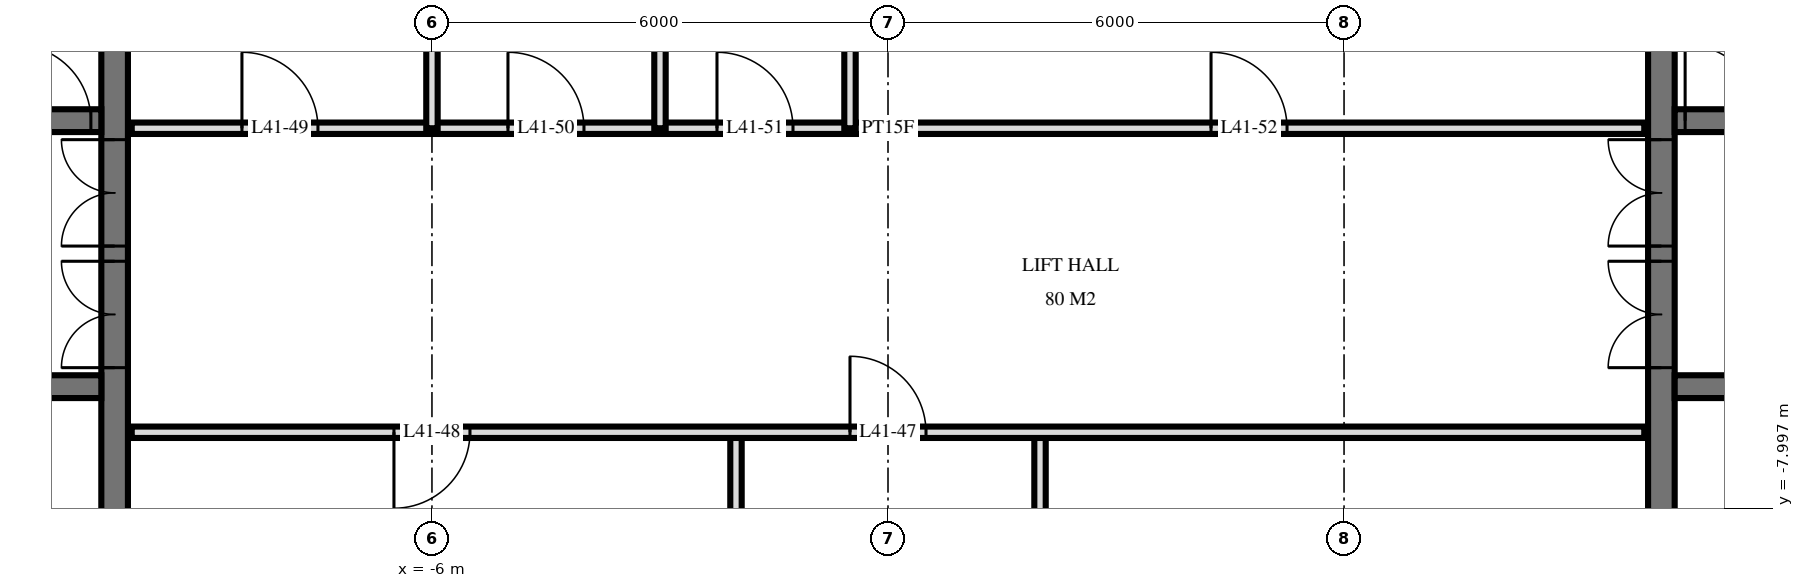
"""IFC4 building model, lengths in metres.
Left out: names, types, materials, properties, quantities, classifications, styles, units other than length and angle.
Written with IfcOpenShell. Run it as: python <this file> out.ifc"""

import sys

from ifc_helpers import new_model, si_unit, direction, frame, frame_2d, origin, place, context, subcontext, project, spatial, rectangle, extrude, element, fill, save


model = new_model("IFC4")
c1 = context("Model", 3, precision=1e-05, world=origin(), true_north=direction((0.0, 1.0)))
c2 = subcontext(c1, "Body", "Model", "MODEL_VIEW")
j1 = project(units=[si_unit("LENGTHUNIT", "METRE"), si_unit("PLANEANGLEUNIT", "RADIAN")], contexts=[c1])
p1 = place(None, origin())
s1 = spatial("IfcSite", under=j1, at=p1, CompositionType="ELEMENT")
p2 = place(p1, origin())
s2 = spatial("IfcBuilding", under=s1, at=p2, CompositionType="ELEMENT")
p3 = place(p2, frame((0.0, 0.0, 159.6)))
s3 = spatial("IfcBuildingStorey", under=s2, at=p3, CompositionType="ELEMENT", Elevation=159.6)
p4 = place(p3, frame((-10.175, -14.55, 0.0), z_axis=(0.0, 0.0, 1.0), x_axis=(0.0, 1.0, 0.0)))
e1 = element("IfcWall", 1, at=p4, inside=s3, PredefinedType="SHEAR", context=c2, shape_type="SweptSolid", body=[
    extrude(rectangle(XDim=14.1, YDim=0.35, at=frame_2d((7.05, 0.0))), origin(), (0.0, 0.0, 1.0), 3.6),
])
p5 = place(p4, frame((8.4, 0.0, 0.0)))
e2 = element("IfcOpeningElement", 2, at=p5, cuts=e1, PredefinedType="OPENING", context=c2, shape_type="SweptSolid", body=[
    extrude(rectangle(XDim=1.4, YDim=2.4, at=frame_2d((0.7, 1.2))), frame((0.0, 0.185, 0.0), z_axis=(0.0, -1.0, 0.0), x_axis=(1.0, 0.0, 0.0)), (0.0, 0.0, 1.0), 0.37),
])
p6 = place(p4, frame((10.0, 0.0, 0.0)))
e3 = element("IfcOpeningElement", 3, at=p6, cuts=e1, PredefinedType="OPENING", context=c2, shape_type="SweptSolid", body=[
    extrude(rectangle(XDim=1.4, YDim=2.4, at=frame_2d((0.7, 1.2))), frame((0.0, 0.185, 0.0), z_axis=(0.0, -1.0, 0.0), x_axis=(1.0, 0.0, 0.0)), (0.0, 0.0, 1.0), 0.37),
])
p7 = place(p4, frame((4.0, 0.0, 0.0)))
e4 = element("IfcOpeningElement", 4, at=p7, cuts=e1, PredefinedType="OPENING", context=c2, shape_type="SweptSolid", body=[
    extrude(rectangle(XDim=1.2, YDim=2.1, at=frame_2d((0.6, 1.05))), frame((0.0, 0.185, 0.0), z_axis=(0.0, -1.0, 0.0), x_axis=(1.0, 0.0, 0.0)), (0.0, 0.0, 1.0), 0.37),
])
p8 = place(p3, frame((-24.05, -2.9, 0.0), z_axis=(0.0, 0.0, 1.0), x_axis=(1.0, 0.0, 0.0)))
e5 = element("IfcWall", 5, at=p8, inside=s3, PredefinedType="SHEAR", context=c2, shape_type="SweptSolid", body=[
    extrude(rectangle(XDim=13.7, YDim=0.3, at=frame_2d((6.85, 0.0))), origin(), (0.0, 0.0, 1.0), 3.6),
])
p9 = place(p8, frame((0.55, 0.0, 0.0)))
e6 = element("IfcOpeningElement", 6, at=p9, cuts=e5, PredefinedType="OPENING", context=c2, shape_type="SweptSolid", body=[
    extrude(rectangle(XDim=1.1, YDim=2.1, at=frame_2d((0.55, 1.05))), frame((0.0, 0.16, 0.0), z_axis=(0.0, -1.0, 0.0), x_axis=(1.0, 0.0, 0.0)), (0.0, 0.0, 1.0), 0.32),
])
p10 = place(p8, frame((6.613, 0.0, 0.0)))
e7 = element("IfcOpeningElement", 7, at=p10, cuts=e5, PredefinedType="OPENING", context=c2, shape_type="SweptSolid", body=[
    extrude(rectangle(XDim=0.9, YDim=2.1, at=frame_2d((0.45, 1.05))), frame((0.0, 0.16, 0.0), z_axis=(0.0, -1.0, 0.0), x_axis=(1.0, 0.0, 0.0)), (0.0, 0.0, 1.0), 0.32),
])
p11 = place(p8, frame((5.188, 0.0, 0.0)))
e8 = element("IfcOpeningElement", 8, at=p11, cuts=e5, PredefinedType="OPENING", context=c2, shape_type="SweptSolid", body=[
    extrude(rectangle(XDim=0.9, YDim=2.1, at=frame_2d((0.45, 1.05))), frame((0.0, 0.16, 0.0), z_axis=(0.0, -1.0, 0.0), x_axis=(1.0, 0.0, 0.0)), (0.0, 0.0, 1.0), 0.32),
])
p12 = place(p8, frame((12.562, 0.0, 0.0)))
e9 = element("IfcOpeningElement", 9, at=p12, cuts=e5, PredefinedType="OPENING", context=c2, shape_type="SweptSolid", body=[
    extrude(rectangle(XDim=1.0, YDim=2.1, at=frame_2d((0.5, 1.05))), frame((0.0, 0.16, 0.0), z_axis=(0.0, -1.0, 0.0), x_axis=(1.0, 0.0, 0.0)), (0.0, 0.0, 1.0), 0.32),
])
p13 = place(p8, frame((11.137, 0.0, 0.0)))
e10 = element("IfcOpeningElement", 10, at=p13, cuts=e5, PredefinedType="OPENING", context=c2, shape_type="SweptSolid", body=[
    extrude(rectangle(XDim=1.0, YDim=2.1, at=frame_2d((0.5, 1.05))), frame((0.0, 0.16, 0.0), z_axis=(0.0, -1.0, 0.0), x_axis=(1.0, 0.0, 0.0)), (0.0, 0.0, 1.0), 0.32),
])
p14 = place(p8, frame((8.85, 0.0, 0.0)))
e11 = element("IfcOpeningElement", 11, at=p14, cuts=e5, PredefinedType="OPENING", context=c2, shape_type="SweptSolid", body=[
    extrude(rectangle(XDim=1.0, YDim=2.1, at=frame_2d((0.5, 1.05))), frame((0.0, 0.16, 0.0), z_axis=(0.0, -1.0, 0.0), x_axis=(1.0, 0.0, 0.0)), (0.0, 0.0, 1.0), 0.32),
])
p15 = place(p8, frame((3.0, 0.0, 0.0)))
e12 = element("IfcOpeningElement", 12, at=p15, cuts=e5, PredefinedType="OPENING", context=c2, shape_type="SweptSolid", body=[
    extrude(rectangle(XDim=1.0, YDim=2.1, at=frame_2d((0.5, 1.05))), frame((0.0, 0.16, 0.0), z_axis=(0.0, -1.0, 0.0), x_axis=(1.0, 0.0, 0.0)), (0.0, 0.0, 1.0), 0.32),
])
p16 = place(p3, frame((-24.05, -6.4, 0.0), z_axis=(0.0, 0.0, 1.0), x_axis=(1.0, 0.0, 0.0)))
e13 = element("IfcWall", 13, at=p16, inside=s3, PredefinedType="SHEAR", context=c2, shape_type="SweptSolid", body=[
    extrude(rectangle(XDim=13.7, YDim=0.3, at=frame_2d((6.85, 0.0))), origin(), (0.0, 0.0, 1.0), 3.6),
])
p17 = place(p16, frame((0.55, 0.0, 0.0)))
e14 = element("IfcOpeningElement", 14, at=p17, cuts=e13, PredefinedType="OPENING", context=c2, shape_type="SweptSolid", body=[
    extrude(rectangle(XDim=1.1, YDim=2.1, at=frame_2d((0.55, 1.05))), frame((0.0, 0.16, 0.0), z_axis=(0.0, -1.0, 0.0), x_axis=(1.0, 0.0, 0.0)), (0.0, 0.0, 1.0), 0.32),
])
p18 = place(p16, frame((5.8, 0.0, 0.0)))
e15 = element("IfcOpeningElement", 15, at=p18, cuts=e13, PredefinedType="OPENING", context=c2, shape_type="SweptSolid", body=[
    extrude(rectangle(XDim=1.1, YDim=2.1, at=frame_2d((0.55, 1.05))), frame((0.0, 0.16, 0.0), z_axis=(0.0, -1.0, 0.0), x_axis=(1.0, 0.0, 0.0)), (0.0, 0.0, 1.0), 0.32),
])
p19 = place(p3, frame((10.175, -14.55, 0.0), z_axis=(0.0, 0.0, 1.0), x_axis=(0.0, 1.0, 0.0)))
e16 = element("IfcWall", 16, at=p19, inside=s3, PredefinedType="SHEAR", context=c2, shape_type="SweptSolid", body=[
    extrude(rectangle(XDim=14.1, YDim=0.35, at=frame_2d((7.05, 0.0))), origin(), (0.0, 0.0, 1.0), 3.6),
])
p20 = place(p19, frame((8.4, 0.0, 0.0)))
e17 = element("IfcOpeningElement", 17, at=p20, cuts=e16, PredefinedType="OPENING", context=c2, shape_type="SweptSolid", body=[
    extrude(rectangle(XDim=1.4, YDim=2.4, at=frame_2d((0.7, 1.2))), frame((0.0, 0.185, 0.0), z_axis=(0.0, -1.0, 0.0), x_axis=(1.0, 0.0, 0.0)), (0.0, 0.0, 1.0), 0.37),
])
p21 = place(p19, frame((10.0, 0.0, 0.0)))
e18 = element("IfcOpeningElement", 18, at=p21, cuts=e16, PredefinedType="OPENING", context=c2, shape_type="SweptSolid", body=[
    extrude(rectangle(XDim=1.4, YDim=2.4, at=frame_2d((0.7, 1.2))), frame((0.0, 0.185, 0.0), z_axis=(0.0, -1.0, 0.0), x_axis=(1.0, 0.0, 0.0)), (0.0, 0.0, 1.0), 0.37),
])
p22 = place(p19, frame((4.0, 0.0, 0.0)))
e19 = element("IfcOpeningElement", 19, at=p22, cuts=e16, PredefinedType="OPENING", context=c2, shape_type="SweptSolid", body=[
    extrude(rectangle(XDim=1.2, YDim=2.1, at=frame_2d((0.6, 1.05))), frame((0.0, 0.185, 0.0), z_axis=(0.0, -1.0, 0.0), x_axis=(1.0, 0.0, 0.0)), (0.0, 0.0, 1.0), 0.37),
])
p23 = place(p3, frame((10.35, -2.9, 0.0), z_axis=(0.0, 0.0, 1.0), x_axis=(1.0, 0.0, 0.0)))
e20 = element("IfcWall", 20, at=p23, inside=s3, PredefinedType="SHEAR", context=c2, shape_type="SweptSolid", body=[
    extrude(rectangle(XDim=13.7, YDim=0.3, at=frame_2d((6.85, 0.0))), origin(), (0.0, 0.0, 1.0), 3.6),
])
p24 = place(p23, frame((12.05, 0.0, 0.0)))
e21 = element("IfcOpeningElement", 21, at=p24, cuts=e20, PredefinedType="OPENING", context=c2, shape_type="SweptSolid", body=[
    extrude(rectangle(XDim=1.1, YDim=2.1, at=frame_2d((0.55, 1.05))), frame((0.0, 0.16, 0.0), z_axis=(0.0, -1.0, 0.0), x_axis=(1.0, 0.0, 0.0)), (0.0, 0.0, 1.0), 0.32),
])
p25 = place(p23, frame((6.188, 0.0, 0.0)))
e22 = element("IfcOpeningElement", 22, at=p25, cuts=e20, PredefinedType="OPENING", context=c2, shape_type="SweptSolid", body=[
    extrude(rectangle(XDim=0.9, YDim=2.1, at=frame_2d((0.45, 1.05))), frame((0.0, 0.16, 0.0), z_axis=(0.0, -1.0, 0.0), x_axis=(1.0, 0.0, 0.0)), (0.0, 0.0, 1.0), 0.32),
])
p26 = place(p23, frame((7.613, 0.0, 0.0)))
e23 = element("IfcOpeningElement", 23, at=p26, cuts=e20, PredefinedType="OPENING", context=c2, shape_type="SweptSolid", body=[
    extrude(rectangle(XDim=0.9, YDim=2.1, at=frame_2d((0.45, 1.05))), frame((0.0, 0.16, 0.0), z_axis=(0.0, -1.0, 0.0), x_axis=(1.0, 0.0, 0.0)), (0.0, 0.0, 1.0), 0.32),
])
p27 = place(p23, frame((0.137, 0.0, 0.0)))
e24 = element("IfcOpeningElement", 24, at=p27, cuts=e20, PredefinedType="OPENING", context=c2, shape_type="SweptSolid", body=[
    extrude(rectangle(XDim=1.0, YDim=2.1, at=frame_2d((0.5, 1.05))), frame((0.0, 0.16, 0.0), z_axis=(0.0, -1.0, 0.0), x_axis=(1.0, 0.0, 0.0)), (0.0, 0.0, 1.0), 0.32),
])
p28 = place(p23, frame((1.562, 0.0, 0.0)))
e25 = element("IfcOpeningElement", 25, at=p28, cuts=e20, PredefinedType="OPENING", context=c2, shape_type="SweptSolid", body=[
    extrude(rectangle(XDim=1.0, YDim=2.1, at=frame_2d((0.5, 1.05))), frame((0.0, 0.16, 0.0), z_axis=(0.0, -1.0, 0.0), x_axis=(1.0, 0.0, 0.0)), (0.0, 0.0, 1.0), 0.32),
])
p29 = place(p23, frame((3.85, 0.0, 0.0)))
e26 = element("IfcOpeningElement", 26, at=p29, cuts=e20, PredefinedType="OPENING", context=c2, shape_type="SweptSolid", body=[
    extrude(rectangle(XDim=1.0, YDim=2.1, at=frame_2d((0.5, 1.05))), frame((0.0, 0.16, 0.0), z_axis=(0.0, -1.0, 0.0), x_axis=(1.0, 0.0, 0.0)), (0.0, 0.0, 1.0), 0.32),
])
p30 = place(p23, frame((9.7, 0.0, 0.0)))
e27 = element("IfcOpeningElement", 27, at=p30, cuts=e20, PredefinedType="OPENING", context=c2, shape_type="SweptSolid", body=[
    extrude(rectangle(XDim=1.0, YDim=2.1, at=frame_2d((0.5, 1.05))), frame((0.0, 0.16, 0.0), z_axis=(0.0, -1.0, 0.0), x_axis=(1.0, 0.0, 0.0)), (0.0, 0.0, 1.0), 0.32),
])
p31 = place(p3, frame((10.35, -6.4, 0.0), z_axis=(0.0, 0.0, 1.0), x_axis=(1.0, 0.0, 0.0)))
e28 = element("IfcWall", 28, at=p31, inside=s3, PredefinedType="SHEAR", context=c2, shape_type="SweptSolid", body=[
    extrude(rectangle(XDim=13.7, YDim=0.3, at=frame_2d((6.85, 0.0))), origin(), (0.0, 0.0, 1.0), 3.6),
])
p32 = place(p31, frame((12.05, 0.0, 0.0)))
e29 = element("IfcOpeningElement", 29, at=p32, cuts=e28, PredefinedType="OPENING", context=c2, shape_type="SweptSolid", body=[
    extrude(rectangle(XDim=1.1, YDim=2.1, at=frame_2d((0.55, 1.05))), frame((0.0, 0.16, 0.0), z_axis=(0.0, -1.0, 0.0), x_axis=(1.0, 0.0, 0.0)), (0.0, 0.0, 1.0), 0.32),
])
p33 = place(p31, frame((6.8, 0.0, 0.0)))
e30 = element("IfcOpeningElement", 30, at=p33, cuts=e28, PredefinedType="OPENING", context=c2, shape_type="SweptSolid", body=[
    extrude(rectangle(XDim=1.1, YDim=2.1, at=frame_2d((0.55, 1.05))), frame((0.0, 0.16, 0.0), z_axis=(0.0, -1.0, 0.0), x_axis=(1.0, 0.0, 0.0)), (0.0, 0.0, 1.0), 0.32),
])
p34 = place(p3, frame((2.0, -11.0, 0.0), z_axis=(0.0, 0.0, 1.0), x_axis=(0.0, 1.0, 0.0)))
e31 = element("IfcWall", 31, at=p34, inside=s3, PredefinedType="PARTITIONING", context=c2, shape_type="SweptSolid", body=[
    extrude(rectangle(XDim=4.0, YDim=0.15, at=frame_2d((2.0, 0.0))), origin(), (0.0, 0.0, 1.0), 3.32),
])
p35 = place(p3, frame((-0.5, -3.0, 0.0), z_axis=(0.0, 0.0, 1.0), x_axis=(0.0, 1.0, 0.0)))
e32 = element("IfcWall", 32, at=p35, inside=s3, PredefinedType="PLUMBINGWALL", context=c2, shape_type="SweptSolid", body=[
    extrude(rectangle(XDim=4.02, YDim=0.15, at=frame_2d((2.01, 0.0))), origin(), (0.0, 0.0, 1.0), 3.32),
])
p36 = place(p3, frame((-2.0, -11.0, 0.0), z_axis=(0.0, 0.0, 1.0), x_axis=(0.0, 1.0, 0.0)))
e33 = element("IfcWall", 33, at=p36, inside=s3, PredefinedType="PARTITIONING", context=c2, shape_type="SweptSolid", body=[
    extrude(rectangle(XDim=4.0, YDim=0.15, at=frame_2d((2.0, 0.0))), origin(), (0.0, 0.0, 1.0), 3.32),
])
for number, where, z_axis, x_axis in (
    (34, (-3.0, -3.0, 0.0), (0.0, 0.0, 1.0), (0.0, 1.0, 0.0)),
    (35, (-6.0, -3.0, 0.0), (0.0, 0.0, 1.0), (0.0, 1.0, 0.0)),
):
    element("IfcWall", number, at=place(p3, frame(where, z_axis=z_axis, x_axis=x_axis)), inside=s3, PredefinedType="PLUMBINGWALL", context=c2, shape_type="SweptSolid", body=[
        extrude(rectangle(XDim=4.02, YDim=0.15, at=frame_2d((2.01, 0.0))), origin(), (0.0, 0.0, 1.0), 3.32),
    ])
p37 = place(p3, frame((-9.95, -7.0, 0.0), z_axis=(0.0, 0.0, 1.0), x_axis=(1.0, 0.0, 0.0)))
e36 = element("IfcWall", 36, at=p37, inside=s3, PredefinedType="PARTITIONING", context=c2, shape_type="SweptSolid", body=[
    extrude(rectangle(XDim=19.9, YDim=0.15, at=frame_2d((9.95, 0.0))), origin(), (0.0, 0.0, 1.0), 3.32),
])
p38 = place(p37, frame((9.45, 0.0, 0.0)))
e37 = element("IfcOpeningElement", 37, at=p38, cuts=e36, PredefinedType="OPENING", context=c2, shape_type="SweptSolid", body=[
    extrude(rectangle(XDim=1.0, YDim=2.1, at=frame_2d((0.5, 1.05))), frame((0.0, 0.085, 0.0), z_axis=(0.0, -1.0, 0.0), x_axis=(1.0, 0.0, 0.0)), (0.0, 0.0, 1.0), 0.17),
])
p39 = place(p37, frame((3.45, 0.0, 0.0)))
e38 = element("IfcOpeningElement", 38, at=p39, cuts=e36, PredefinedType="OPENING", context=c2, shape_type="SweptSolid", body=[
    extrude(rectangle(XDim=1.0, YDim=2.1, at=frame_2d((0.5, 1.05))), frame((0.0, 0.085, 0.0), z_axis=(0.0, -1.0, 0.0), x_axis=(1.0, 0.0, 0.0)), (0.0, 0.0, 1.0), 0.17),
])
p40 = place(p3, frame((-9.95, -3.0, 0.0), z_axis=(0.0, 0.0, 1.0), x_axis=(1.0, 0.0, 0.0)))
e39 = element("IfcWall", 39, at=p40, inside=s3, PredefinedType="PARTITIONING", context=c2, shape_type="SweptSolid", body=[
    extrude(rectangle(XDim=19.9, YDim=0.15, at=frame_2d((9.95, 0.0))), origin(), (0.0, 0.0, 1.0), 3.32),
])
p41 = place(p40, frame((1.45, 0.0, 0.0)))
e40 = element("IfcOpeningElement", 40, at=p41, cuts=e39, PredefinedType="OPENING", context=c2, shape_type="SweptSolid", body=[
    extrude(rectangle(XDim=1.0, YDim=2.1, at=frame_2d((0.5, 1.05))), frame((0.0, 0.085, 0.0), z_axis=(0.0, -1.0, 0.0), x_axis=(1.0, 0.0, 0.0)), (0.0, 0.0, 1.0), 0.17),
])
p42 = place(p40, frame((4.95, 0.0, 0.0)))
e41 = element("IfcOpeningElement", 41, at=p42, cuts=e39, PredefinedType="OPENING", context=c2, shape_type="SweptSolid", body=[
    extrude(rectangle(XDim=1.0, YDim=2.1, at=frame_2d((0.5, 1.05))), frame((0.0, 0.085, 0.0), z_axis=(0.0, -1.0, 0.0), x_axis=(1.0, 0.0, 0.0)), (0.0, 0.0, 1.0), 0.17),
])
p43 = place(p40, frame((7.7, 0.0, 0.0)))
e42 = element("IfcOpeningElement", 42, at=p43, cuts=e39, PredefinedType="OPENING", context=c2, shape_type="SweptSolid", body=[
    extrude(rectangle(XDim=1.0, YDim=2.1, at=frame_2d((0.5, 1.05))), frame((0.0, 0.085, 0.0), z_axis=(0.0, -1.0, 0.0), x_axis=(1.0, 0.0, 0.0)), (0.0, 0.0, 1.0), 0.17),
])
p44 = place(p40, frame((14.2, 0.0, 0.0)))
e43 = element("IfcOpeningElement", 43, at=p44, cuts=e39, PredefinedType="OPENING", context=c2, shape_type="SweptSolid", body=[
    extrude(rectangle(XDim=1.0, YDim=2.1, at=frame_2d((0.5, 1.05))), frame((0.0, 0.085, 0.0), z_axis=(0.0, -1.0, 0.0), x_axis=(1.0, 0.0, 0.0)), (0.0, 0.0, 1.0), 0.17),
])
p45 = place(p5, origin())
e44 = element("IfcDoor", 44, at=p45, inside=s3, OperationType="DOUBLE_DOOR_SINGLE_SWING", PredefinedType="DOOR", context=c2, shape_type="SweptSolid", body=[
    extrude(rectangle(XDim=1.4, YDim=2.4, at=frame_2d((0.7, 1.2))), frame((0.0, 0.025, 0.0), z_axis=(0.0, -1.0, 0.0), x_axis=(1.0, 0.0, 0.0)), (0.0, 0.0, 1.0), 0.05),
])
fill(e2, e44)
p46 = place(p6, origin())
e45 = element("IfcDoor", 45, at=p46, inside=s3, OperationType="DOUBLE_DOOR_SINGLE_SWING", PredefinedType="DOOR", context=c2, shape_type="SweptSolid", body=[
    extrude(rectangle(XDim=1.4, YDim=2.4, at=frame_2d((0.7, 1.2))), frame((0.0, 0.025, 0.0), z_axis=(0.0, -1.0, 0.0), x_axis=(1.0, 0.0, 0.0)), (0.0, 0.0, 1.0), 0.05),
])
fill(e3, e45)
p47 = place(p12, origin())
e46 = element("IfcDoor", 46, at=p47, inside=s3, OperationType="SINGLE_SWING_RIGHT", PredefinedType="DOOR", context=c2, shape_type="SweptSolid", body=[
    extrude(rectangle(XDim=1.0, YDim=2.1, at=frame_2d((0.5, 1.05))), frame((0.0, 0.025, 0.0), z_axis=(0.0, -1.0, 0.0), x_axis=(1.0, 0.0, 0.0)), (0.0, 0.0, 1.0), 0.05),
])
fill(e9, e46)
p48 = place(p20, origin())
e47 = element("IfcDoor", 47, at=p48, inside=s3, OperationType="DOUBLE_DOOR_SINGLE_SWING", PredefinedType="DOOR", context=c2, shape_type="SweptSolid", body=[
    extrude(rectangle(XDim=1.4, YDim=2.4, at=frame_2d((0.7, 1.2))), frame((0.0, 0.025, 0.0), z_axis=(0.0, -1.0, 0.0), x_axis=(1.0, 0.0, 0.0)), (0.0, 0.0, 1.0), 0.05),
])
fill(e17, e47)
p49 = place(p21, origin())
e48 = element("IfcDoor", 48, at=p49, inside=s3, OperationType="DOUBLE_DOOR_SINGLE_SWING", PredefinedType="DOOR", context=c2, shape_type="SweptSolid", body=[
    extrude(rectangle(XDim=1.4, YDim=2.4, at=frame_2d((0.7, 1.2))), frame((0.0, 0.025, 0.0), z_axis=(0.0, -1.0, 0.0), x_axis=(1.0, 0.0, 0.0)), (0.0, 0.0, 1.0), 0.05),
])
fill(e18, e48)
p50 = place(p27, origin())
e49 = element("IfcDoor", 49, at=p50, inside=s3, OperationType="SINGLE_SWING_RIGHT", PredefinedType="DOOR", context=c2, shape_type="SweptSolid", body=[
    extrude(rectangle(XDim=1.0, YDim=2.1, at=frame_2d((0.5, 1.05))), frame((0.0, 0.025, 0.0), z_axis=(0.0, -1.0, 0.0), x_axis=(1.0, 0.0, 0.0)), (0.0, 0.0, 1.0), 0.05),
])
fill(e24, e49)
p51 = place(p38, origin())
e50 = element("IfcDoor", 50, at=p51, inside=s3, OperationType="SINGLE_SWING_RIGHT", PredefinedType="DOOR", context=c2, shape_type="SweptSolid", body=[
    extrude(rectangle(XDim=1.0, YDim=2.1, at=frame_2d((0.5, 1.05))), frame((0.0, 0.025, 0.0), z_axis=(0.0, -1.0, 0.0), x_axis=(1.0, 0.0, 0.0)), (0.0, 0.0, 1.0), 0.05),
])
fill(e37, e50)
p52 = place(p39, frame((0.5, 0.0, 0.0), z_axis=(0.0, 0.0, 1.0), x_axis=(-1.0, 0.0, 0.0)))
e51 = element("IfcDoor", 51, at=p52, inside=s3, OperationType="SINGLE_SWING_LEFT", PredefinedType="DOOR", context=c2, shape_type="SweptSolid", body=[
    extrude(rectangle(XDim=1.0, YDim=2.1, at=frame_2d((0.0, 1.05))), frame((0.0, -0.025, 0.0), z_axis=(0.0, 1.0, 0.0), x_axis=(-1.0, 0.0, 0.0)), (0.0, 0.0, 1.0), 0.05),
])
fill(e38, e51)
p53 = place(p41, origin())
e52 = element("IfcDoor", 52, at=p53, inside=s3, OperationType="SINGLE_SWING_RIGHT", PredefinedType="DOOR", context=c2, shape_type="SweptSolid", body=[
    extrude(rectangle(XDim=1.0, YDim=2.1, at=frame_2d((0.5, 1.05))), frame((0.0, 0.025, 0.0), z_axis=(0.0, -1.0, 0.0), x_axis=(1.0, 0.0, 0.0)), (0.0, 0.0, 1.0), 0.05),
])
fill(e40, e52)
p54 = place(p42, origin())
e53 = element("IfcDoor", 53, at=p54, inside=s3, OperationType="SINGLE_SWING_RIGHT", PredefinedType="DOOR", context=c2, shape_type="SweptSolid", body=[
    extrude(rectangle(XDim=1.0, YDim=2.1, at=frame_2d((0.5, 1.05))), frame((0.0, 0.025, 0.0), z_axis=(0.0, -1.0, 0.0), x_axis=(1.0, 0.0, 0.0)), (0.0, 0.0, 1.0), 0.05),
])
fill(e41, e53)
p55 = place(p43, origin())
e54 = element("IfcDoor", 54, at=p55, inside=s3, OperationType="SINGLE_SWING_RIGHT", PredefinedType="DOOR", context=c2, shape_type="SweptSolid", body=[
    extrude(rectangle(XDim=1.0, YDim=2.1, at=frame_2d((0.5, 1.05))), frame((0.0, 0.025, 0.0), z_axis=(0.0, -1.0, 0.0), x_axis=(1.0, 0.0, 0.0)), (0.0, 0.0, 1.0), 0.05),
])
fill(e42, e54)
p56 = place(p44, origin())
e55 = element("IfcDoor", 55, at=p56, inside=s3, OperationType="SINGLE_SWING_RIGHT", PredefinedType="DOOR", context=c2, shape_type="SweptSolid", body=[
    extrude(rectangle(XDim=1.0, YDim=2.1, at=frame_2d((0.5, 1.05))), frame((0.0, 0.025, 0.0), z_axis=(0.0, -1.0, 0.0), x_axis=(1.0, 0.0, 0.0)), (0.0, 0.0, 1.0), 0.05),
])
fill(e43, e55)
save(model, sys.argv[1])
